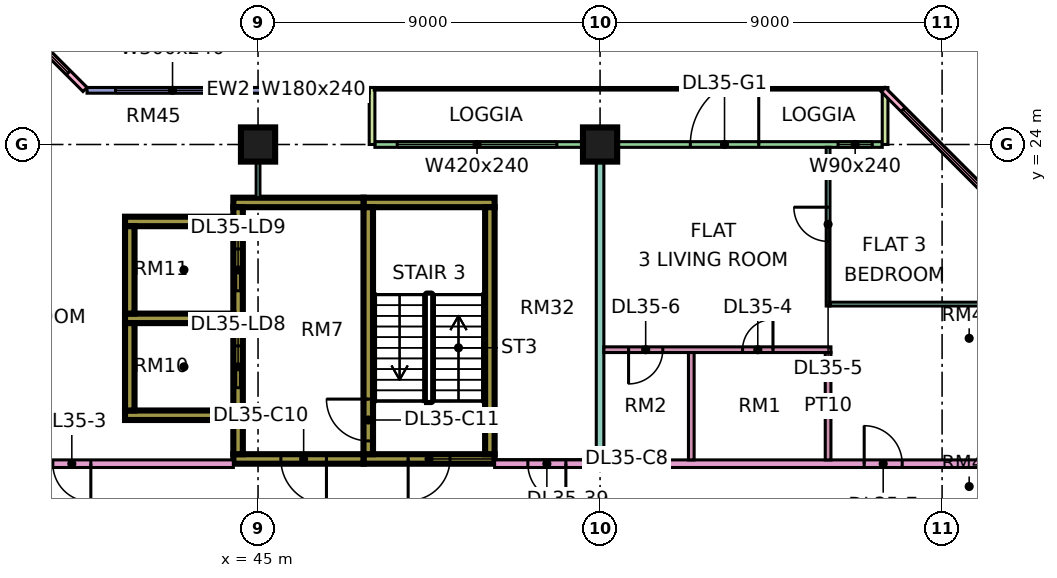
"""IFC4 building model, lengths in metres.
Left out: names, types, materials, properties, quantities, classifications, styles, units other than length and angle.
Written with IfcOpenShell. Run it as: python <this file> out.ifc"""

import sys

from ifc_helpers import new_model, si_unit, direction, frame, frame_2d, origin, origin_2d, place, context, subcontext, project, spatial, rectangle, extrude, element, fill, save


model = new_model("IFC4")
c1 = context("Model", 3, precision=1e-05, world=origin(), true_north=direction((0.0, 1.0)))
c2 = subcontext(c1, "Body", "Model", "MODEL_VIEW")
j1 = project(units=[si_unit("LENGTHUNIT", "METRE"), si_unit("PLANEANGLEUNIT", "RADIAN")], contexts=[c1])
p1 = place(None, origin())
s1 = spatial("IfcSite", under=j1, at=p1, CompositionType="ELEMENT")
p2 = place(p1, origin())
s2 = spatial("IfcBuilding", under=s1, at=p2, CompositionType="ELEMENT")
p3 = place(p2, frame((0.0, 0.0, 157.4)))
s3 = spatial("IfcBuildingStorey", under=s2, at=p3, CompositionType="ELEMENT", Elevation=157.4)
for number, where, z_axis, x_axis in (
    (1, (45.0, 24.0, 0.0), (0.0, 0.0, 1.0), (1.0, 0.0, 0.0)),
    (2, (54.0, 24.0, 0.0), (0.0, 0.0, 1.0), (1.0, 0.0, 0.0)),
):
    element("IfcColumn", number, at=place(p3, frame(where, z_axis=z_axis, x_axis=x_axis)), inside=s3, PredefinedType="COLUMN", context=c2, shape_type="SweptSolid", body=[
        extrude(rectangle(XDim=0.9, YDim=0.9, at=origin_2d()), origin(), (0.0, 0.0, 1.0), 3.75),
    ])
p4 = place(p3, frame((47.775, 15.725, 0.0), z_axis=(0.0, 0.0, 1.0), x_axis=(1.0, 0.0, 0.0)))
e3 = element("IfcWall", 3, at=p4, inside=s3, PredefinedType="SHEAR", context=c2, shape_type="SweptSolid", body=[
    extrude(rectangle(XDim=3.45, YDim=0.25, at=frame_2d((1.725, 0.0))), origin(), (0.0, 0.0, 1.0), 3.75),
])
p5 = place(p4, frame((1.175, 0.0, 0.0)))
e4 = element("IfcOpeningElement", 4, at=p5, cuts=e3, PredefinedType="OPENING", context=c2, shape_type="SweptSolid", body=[
    extrude(rectangle(XDim=1.1, YDim=2.2, at=frame_2d((0.55, 1.1))), frame((0.0, 0.135, 0.0), z_axis=(0.0, -1.0, 0.0), x_axis=(1.0, 0.0, 0.0)), (0.0, 0.0, 1.0), 0.27),
])
p6 = place(p3, frame((47.775, 22.475, 0.0), z_axis=(0.0, 0.0, 1.0), x_axis=(1.0, 0.0, 0.0)))
e5 = element("IfcWall", 5, at=p6, inside=s3, PredefinedType="SHEAR", context=c2, shape_type="SweptSolid", body=[
    extrude(rectangle(XDim=3.45, YDim=0.25, at=frame_2d((1.725, 0.0))), origin(), (0.0, 0.0, 1.0), 3.75),
])
p7 = place(p3, frame((47.9, 15.85, 0.0), z_axis=(0.0, 0.0, 1.0), x_axis=(0.0, 1.0, 0.0)))
e6 = element("IfcWall", 6, at=p7, inside=s3, PredefinedType="SHEAR", context=c2, shape_type="SweptSolid", body=[
    extrude(rectangle(XDim=6.5, YDim=0.25, at=frame_2d((3.25, 0.0))), origin(), (0.0, 0.0, 1.0), 3.75),
])
p8 = place(p7, frame((0.35, 0.0, 0.0)))
e7 = element("IfcOpeningElement", 7, at=p8, cuts=e6, PredefinedType="OPENING", context=c2, shape_type="SweptSolid", body=[
    extrude(rectangle(XDim=1.1, YDim=2.2, at=frame_2d((0.55, 1.1))), frame((0.0, 0.135, 0.0), z_axis=(0.0, -1.0, 0.0), x_axis=(1.0, 0.0, 0.0)), (0.0, 0.0, 1.0), 0.27),
])
p9 = place(p3, frame((51.1, 15.85, 0.0), z_axis=(0.0, 0.0, 1.0), x_axis=(0.0, 1.0, 0.0)))
e8 = element("IfcWall", 8, at=p9, inside=s3, PredefinedType="SHEAR", context=c2, shape_type="SweptSolid", body=[
    extrude(rectangle(XDim=6.5, YDim=0.25, at=frame_2d((3.25, 0.0))), origin(), (0.0, 0.0, 1.0), 3.75),
])
p10 = place(p3, frame((44.35, 15.725, 0.0), z_axis=(0.0, 0.0, 1.0), x_axis=(1.0, 0.0, 0.0)))
e9 = element("IfcWall", 9, at=p10, inside=s3, PredefinedType="SHEAR", context=c2, shape_type="SweptSolid", body=[
    extrude(rectangle(XDim=3.425, YDim=0.25, at=frame_2d((1.712, 0.0))), origin(), (0.0, 0.0, 1.0), 3.75),
])
p11 = place(p10, frame((1.25, 0.0, 0.0)))
e10 = element("IfcOpeningElement", 10, at=p11, cuts=e9, PredefinedType="OPENING", context=c2, shape_type="SweptSolid", body=[
    extrude(rectangle(XDim=1.2, YDim=2.2, at=frame_2d((0.6, 1.1))), frame((0.0, 0.135, 0.0), z_axis=(0.0, -1.0, 0.0), x_axis=(1.0, 0.0, 0.0)), (0.0, 0.0, 1.0), 0.27),
])
p12 = place(p3, frame((44.35, 22.475, 0.0), z_axis=(0.0, 0.0, 1.0), x_axis=(1.0, 0.0, 0.0)))
e11 = element("IfcWall", 11, at=p12, inside=s3, PredefinedType="SHEAR", context=c2, shape_type="SweptSolid", body=[
    extrude(rectangle(XDim=3.425, YDim=0.25, at=frame_2d((1.712, 0.0))), origin(), (0.0, 0.0, 1.0), 3.75),
])
p13 = place(p3, frame((44.475, 15.85, 0.0), z_axis=(0.0, 0.0, 1.0), x_axis=(0.0, 1.0, 0.0)))
e12 = element("IfcWall", 12, at=p13, inside=s3, PredefinedType="SHEAR", context=c2, shape_type="SweptSolid", body=[
    extrude(rectangle(XDim=6.5, YDim=0.25, at=frame_2d((3.25, 0.0))), origin(), (0.0, 0.0, 1.0), 3.75),
])
p14 = place(p13, frame((1.75, 0.0, 0.0)))
e13 = element("IfcOpeningElement", 13, at=p14, cuts=e12, PredefinedType="OPENING", context=c2, shape_type="SweptSolid", body=[
    extrude(rectangle(XDim=1.1, YDim=2.2, at=frame_2d((0.55, 1.1))), frame((0.0, 0.135, 0.0), z_axis=(0.0, -1.0, 0.0), x_axis=(1.0, 0.0, 0.0)), (0.0, 0.0, 1.0), 0.27),
])
p15 = place(p13, frame((4.3, 0.0, 0.0)))
e14 = element("IfcOpeningElement", 14, at=p15, cuts=e12, PredefinedType="OPENING", context=c2, shape_type="SweptSolid", body=[
    extrude(rectangle(XDim=1.1, YDim=2.2, at=frame_2d((0.55, 1.1))), frame((0.0, 0.135, 0.0), z_axis=(0.0, -1.0, 0.0), x_axis=(1.0, 0.0, 0.0)), (0.0, 0.0, 1.0), 0.27),
])
for number, where, z_axis, x_axis in (
    (15, (41.5, 16.875, 0.0), (0.0, 0.0, 1.0), (1.0, 0.0, 0.0)),
    (16, (41.5, 19.425, 0.0), (0.0, 0.0, 1.0), (1.0, 0.0, 0.0)),
    (17, (41.5, 21.975, 0.0), (0.0, 0.0, 1.0), (1.0, 0.0, 0.0)),
):
    element("IfcWall", number, at=place(p3, frame(where, z_axis=z_axis, x_axis=x_axis)), inside=s3, PredefinedType="SHEAR", context=c2, shape_type="SweptSolid", body=[
        extrude(rectangle(XDim=2.85, YDim=0.25, at=frame_2d((1.425, 0.0))), origin(), (0.0, 0.0, 1.0), 3.75),
    ])
for number, where, z_axis, x_axis in (
    (18, (41.625, 17.0, 0.0), (0.0, 0.0, 1.0), (0.0, 1.0, 0.0)),
    (19, (41.625, 19.55, 0.0), (0.0, 0.0, 1.0), (0.0, 1.0, 0.0)),
):
    element("IfcWall", number, at=place(p3, frame(where, z_axis=z_axis, x_axis=x_axis)), inside=s3, PredefinedType="SHEAR", context=c2, shape_type="SweptSolid", body=[
        extrude(rectangle(XDim=2.3, YDim=0.25, at=frame_2d((1.15, 0.0))), origin(), (0.0, 0.0, 1.0), 3.75),
    ])
p16 = place(p3, frame((61.425, 24.0, 0.0), z_axis=(0.0, 0.0, 1.0), x_axis=(-1.0, 0.0, 0.0)))
e20 = element("IfcWall", 20, at=p16, inside=s3, PredefinedType="SOLIDWALL", context=c2, shape_type="SweptSolid", body=[
    extrude(rectangle(XDim=13.35, YDim=0.15, at=frame_2d((6.675, 0.0))), origin(), (0.0, 0.0, 1.0), 3.35),
])
p17 = place(p16, frame((0.262, 0.0, 0.45)))
e21 = element("IfcOpeningElement", 21, at=p17, cuts=e20, PredefinedType="OPENING", context=c2, shape_type="SweptSolid", body=[
    extrude(rectangle(XDim=0.9, YDim=2.4, at=frame_2d((0.45, 1.2))), frame((0.0, 0.085, 0.0), z_axis=(0.0, -1.0, 0.0), x_axis=(1.0, 0.0, 0.0)), (0.0, 0.0, 1.0), 0.17),
])
p18 = place(p16, frame((3.25, 0.0, 0.0)))
e22 = element("IfcOpeningElement", 22, at=p18, cuts=e20, PredefinedType="OPENING", context=c2, shape_type="SweptSolid", body=[
    extrude(rectangle(XDim=1.8, YDim=2.4, at=frame_2d((0.9, 1.2))), frame((0.0, 0.085, 0.0), z_axis=(0.0, -1.0, 0.0), x_axis=(1.0, 0.0, 0.0)), (0.0, 0.0, 1.0), 0.17),
])
p19 = place(p16, frame((8.562, 0.0, 0.45)))
e23 = element("IfcOpeningElement", 23, at=p19, cuts=e20, PredefinedType="OPENING", context=c2, shape_type="SweptSolid", body=[
    extrude(rectangle(XDim=4.2, YDim=2.4, at=frame_2d((2.1, 1.2))), frame((0.0, 0.085, 0.0), z_axis=(0.0, -1.0, 0.0), x_axis=(1.0, 0.0, 0.0)), (0.0, 0.0, 1.0), 0.17),
])
for number, where, z_axis, x_axis in (
    (24, (61.5, 25.5, 0.0), (0.0, 0.0, 1.0), (0.0, -1.0, 0.0)),
    (25, (48.0, 25.5, 0.0), (0.0, 0.0, 1.0), (0.0, -1.0, 0.0)),
):
    element("IfcWall", number, at=place(p3, frame(where, z_axis=z_axis, x_axis=x_axis)), inside=s3, PredefinedType="SOLIDWALL", context=c2, shape_type="SweptSolid", body=[
        extrude(rectangle(XDim=1.5, YDim=0.15, at=frame_2d((0.75, 0.0))), origin(), (0.0, 0.0, 1.0), 3.35),
    ])
p20 = place(p3, frame((47.925, 25.425, 0.0), z_axis=(0.0, 0.0, 1.0), x_axis=(-1.0, 0.0, 0.0)))
e26 = element("IfcWall", 26, at=p20, inside=s3, PredefinedType="SOLIDWALL", context=c2, shape_type="SweptSolid", body=[
    extrude(rectangle(XDim=7.425, YDim=0.15, at=frame_2d((3.712, 0.0))), origin(), (0.0, 0.0, 1.0), 3.35),
])
p21 = place(p20, frame((0.562, 0.0, 0.45)))
e27 = element("IfcOpeningElement", 27, at=p21, cuts=e26, PredefinedType="OPENING", context=c2, shape_type="SweptSolid", body=[
    extrude(rectangle(XDim=1.8, YDim=2.4, at=frame_2d((0.9, 1.2))), frame((0.0, 0.085, 0.0), z_axis=(0.0, -1.0, 0.0), x_axis=(1.0, 0.0, 0.0)), (0.0, 0.0, 1.0), 0.17),
])
p22 = place(p20, frame((3.675, 0.0, 0.45)))
e28 = element("IfcOpeningElement", 28, at=p22, cuts=e26, PredefinedType="OPENING", context=c2, shape_type="SweptSolid", body=[
    extrude(rectangle(XDim=3.0, YDim=2.4, at=frame_2d((1.5, 1.2))), frame((0.0, 0.085, 0.0), z_axis=(0.0, -1.0, 0.0), x_axis=(1.0, 0.0, 0.0)), (0.0, 0.0, 1.0), 0.17),
])
p23 = place(p3, frame((40.447, 25.447, 0.0), z_axis=(0.0, 0.0, 1.0), x_axis=(-0.707106781187, 0.707106781187, 0.0)))
e29 = element("IfcWall", 29, at=p23, inside=s3, PredefinedType="SOLIDWALL", context=c2, shape_type="SweptSolid", body=[
    extrude(rectangle(XDim=4.243, YDim=0.15, at=frame_2d((2.121, 0.0))), origin(), (0.0, 0.0, 1.0), 3.35),
])
p24 = place(p23, frame((0.621, 0.0, 0.45)))
e30 = element("IfcOpeningElement", 30, at=p24, cuts=e29, PredefinedType="OPENING", context=c2, shape_type="SweptSolid", body=[
    extrude(rectangle(XDim=3.0, YDim=2.4, at=frame_2d((1.5, 1.2))), frame((0.0, 0.085, 0.0), z_axis=(0.0, -1.0, 0.0), x_axis=(1.0, 0.0, 0.0)), (0.0, 0.0, 1.0), 0.17),
])
p25 = place(p3, frame((64.447, 22.447, 0.0), z_axis=(0.0, 0.0, 1.0), x_axis=(-0.707106781187, 0.707106781187, 0.0)))
e31 = element("IfcWall", 31, at=p25, inside=s3, PredefinedType="SOLIDWALL", context=c2, shape_type="SweptSolid", body=[
    extrude(rectangle(XDim=4.243, YDim=0.15, at=frame_2d((2.121, 0.0))), origin(), (0.0, 0.0, 1.0), 3.35),
])
p26 = place(p25, frame((0.498, 0.0, 0.45)))
e32 = element("IfcOpeningElement", 32, at=p26, cuts=e31, PredefinedType="OPENING", context=c2, shape_type="SweptSolid", body=[
    extrude(rectangle(XDim=3.0, YDim=2.4, at=frame_2d((1.5, 1.2))), frame((0.0, 0.085, 0.0), z_axis=(0.0, -1.0, 0.0), x_axis=(1.0, 0.0, 0.0)), (0.0, 0.0, 1.0), 0.17),
])
p27 = place(p3, frame((34.0, 15.6, 0.0), z_axis=(0.0, 0.0, 1.0), x_axis=(1.0, 0.0, 0.0)))
e33 = element("IfcWall", 33, at=p27, inside=s3, PredefinedType="PARTITIONING", context=c2, shape_type="SweptSolid", body=[
    extrude(rectangle(XDim=10.35, YDim=0.2, at=frame_2d((5.175, 0.0))), origin(), (0.0, 0.0, 1.0), 3.35),
])
p28 = place(p27, frame((5.6, 0.0, 0.0)))
e34 = element("IfcOpeningElement", 34, at=p28, cuts=e33, PredefinedType="OPENING", context=c2, shape_type="SweptSolid", body=[
    extrude(rectangle(XDim=1.0, YDim=2.1, at=frame_2d((0.5, 1.05))), frame((0.0, 0.11, 0.0), z_axis=(0.0, -1.0, 0.0), x_axis=(1.0, 0.0, 0.0)), (0.0, 0.0, 1.0), 0.22),
])
p29 = place(p27, frame((0.45, 0.0, 0.0)))
e35 = element("IfcOpeningElement", 35, at=p29, cuts=e33, PredefinedType="OPENING", context=c2, shape_type="SweptSolid", body=[
    extrude(rectangle(XDim=1.2, YDim=2.1, at=frame_2d((0.6, 1.05))), frame((0.0, 0.11, 0.0), z_axis=(0.0, -1.0, 0.0), x_axis=(1.0, 0.0, 0.0)), (0.0, 0.0, 1.0), 0.22),
])
p30 = place(p3, frame((45.0, 22.6, 0.0), z_axis=(0.0, 0.0, 1.0), x_axis=(0.0, 1.0, 0.0)))
e36 = element("IfcWall", 36, at=p30, inside=s3, PredefinedType="PARTITIONING", context=c2, shape_type="SweptSolid", body=[
    extrude(rectangle(XDim=1.4, YDim=0.1, at=frame_2d((0.7, 0.0))), origin(), (0.0, 0.0, 1.0), 3.35),
])
p31 = place(p3, frame((51.225, 15.6, 0.0), z_axis=(0.0, 0.0, 1.0), x_axis=(1.0, 0.0, 0.0)))
e37 = element("IfcWall", 37, at=p31, inside=s3, PredefinedType="PARTITIONING", context=c2, shape_type="SweptSolid", body=[
    extrude(rectangle(XDim=13.125, YDim=0.2, at=frame_2d((6.562, 0.0))), origin(), (0.0, 0.0, 1.0), 3.35),
])
p32 = place(p31, frame((9.725, 0.0, 0.0)))
e38 = element("IfcOpeningElement", 38, at=p32, cuts=e37, PredefinedType="OPENING", context=c2, shape_type="SweptSolid", body=[
    extrude(rectangle(XDim=1.0, YDim=2.1, at=frame_2d((0.5, 1.05))), frame((0.0, 0.11, 0.0), z_axis=(0.0, -1.0, 0.0), x_axis=(1.0, 0.0, 0.0)), (0.0, 0.0, 1.0), 0.22),
])
p33 = place(p31, frame((0.875, 0.0, 0.0)))
e39 = element("IfcOpeningElement", 39, at=p33, cuts=e37, PredefinedType="OPENING", context=c2, shape_type="SweptSolid", body=[
    extrude(rectangle(XDim=1.0, YDim=2.1, at=frame_2d((0.5, 1.05))), frame((0.0, 0.11, 0.0), z_axis=(0.0, -1.0, 0.0), x_axis=(1.0, 0.0, 0.0)), (0.0, 0.0, 1.0), 0.22),
])
p34 = place(p3, frame((54.0, 15.7, 0.0), z_axis=(0.0, 0.0, 1.0), x_axis=(0.0, 1.0, 0.0)))
e40 = element("IfcWall", 40, at=p34, inside=s3, PredefinedType="PARTITIONING", context=c2, shape_type="SweptSolid", body=[
    extrude(rectangle(XDim=8.226, YDim=0.2, at=frame_2d((4.113, 0.0))), origin(), (0.0, 0.0, 1.0), 3.35),
])
p35 = place(p3, frame((54.1, 18.6, 0.0), z_axis=(0.0, 0.0, 1.0), x_axis=(1.0, 0.0, 0.0)))
e41 = element("IfcWall", 41, at=p35, inside=s3, PredefinedType="PARTITIONING", context=c2, shape_type="SweptSolid", body=[
    extrude(rectangle(XDim=5.975, YDim=0.15, at=frame_2d((2.987, 0.0))), origin(), (0.0, 0.0, 1.0), 3.35),
])
p36 = place(p35, frame((3.65, 0.0, 0.0)))
e42 = element("IfcOpeningElement", 42, at=p36, cuts=e41, PredefinedType="OPENING", context=c2, shape_type="SweptSolid", body=[
    extrude(rectangle(XDim=0.8, YDim=2.1, at=frame_2d((0.4, 1.05))), frame((0.0, 0.085, 0.0), z_axis=(0.0, -1.0, 0.0), x_axis=(1.0, 0.0, 0.0)), (0.0, 0.0, 1.0), 0.17),
])
p37 = place(p35, frame((0.65, 0.0, 0.0)))
e43 = element("IfcOpeningElement", 43, at=p37, cuts=e41, PredefinedType="OPENING", context=c2, shape_type="SweptSolid", body=[
    extrude(rectangle(XDim=0.9, YDim=2.1, at=frame_2d((0.45, 1.05))), frame((0.0, 0.085, 0.0), z_axis=(0.0, -1.0, 0.0), x_axis=(1.0, 0.0, 0.0)), (0.0, 0.0, 1.0), 0.17),
])
for number, where, z_axis, x_axis in (
    (44, (56.4, 15.7, 0.0), (0.0, 0.0, 1.0), (0.0, 1.0, 0.0)),
    (45, (60.0, 15.7, 0.0), (0.0, 0.0, 1.0), (0.0, 1.0, 0.0)),
):
    element("IfcWall", number, at=place(p3, frame(where, z_axis=z_axis, x_axis=x_axis)), inside=s3, PredefinedType="PARTITIONING", context=c2, shape_type="SweptSolid", body=[
        extrude(rectangle(XDim=2.825, YDim=0.15, at=frame_2d((1.413, 0.0))), origin(), (0.0, 0.0, 1.0), 3.35),
    ])
p38 = place(p3, frame((60.0, 19.75, 0.0), z_axis=(0.0, 0.0, 1.0), x_axis=(0.0, 1.0, 0.0)))
e46 = element("IfcWall", 46, at=p38, inside=s3, PredefinedType="PARTITIONING", context=c2, shape_type="SweptSolid", body=[
    extrude(rectangle(XDim=4.176, YDim=0.1, at=frame_2d((2.088, 0.0))), origin(), (0.0, 0.0, 1.0), 3.35),
])
p39 = place(p38, frame((1.7, 0.0, 0.0)))
e47 = element("IfcOpeningElement", 47, at=p39, cuts=e46, PredefinedType="OPENING", context=c2, shape_type="SweptSolid", body=[
    extrude(rectangle(XDim=0.9, YDim=2.1, at=frame_2d((0.45, 1.05))), frame((0.0, 0.06, 0.0), z_axis=(0.0, -1.0, 0.0), x_axis=(1.0, 0.0, 0.0)), (0.0, 0.0, 1.0), 0.12),
])
p40 = place(p3, frame((60.05, 19.8, 0.0), z_axis=(0.0, 0.0, 1.0), x_axis=(1.0, 0.0, 0.0)))
e48 = element("IfcWall", 48, at=p40, inside=s3, PredefinedType="PARTITIONING", context=c2, shape_type="SweptSolid", body=[
    extrude(rectangle(XDim=4.3, YDim=0.1, at=frame_2d((2.15, 0.0))), origin(), (0.0, 0.0, 1.0), 3.35),
])
p41 = place(p17, origin())
e49 = element("IfcWindow", 49, at=p41, inside=s3, PartitioningType="SINGLE_PANEL", PredefinedType="WINDOW", context=c2, shape_type="SweptSolid", body=[
    extrude(rectangle(XDim=0.9, YDim=2.4, at=frame_2d((0.45, 1.2))), frame((0.0, 0.03, 0.0), z_axis=(0.0, -1.0, 0.0), x_axis=(1.0, 0.0, 0.0)), (0.0, 0.0, 1.0), 0.06),
])
fill(e21, e49)
p42 = place(p18, frame((1.8, 0.0, 0.0), z_axis=(0.0, 0.0, 1.0), x_axis=(-1.0, 0.0, 0.0)))
e50 = element("IfcDoor", 50, at=p42, inside=s3, OperationType="DOUBLE_DOOR_SINGLE_SWING", PredefinedType="DOOR", context=c2, shape_type="SweptSolid", body=[
    extrude(rectangle(XDim=1.8, YDim=2.4, at=frame_2d((0.9, 1.2))), frame((0.0, 0.025, 0.0), z_axis=(0.0, -1.0, 0.0), x_axis=(1.0, 0.0, 0.0)), (0.0, 0.0, 1.0), 0.05),
])
fill(e22, e50)
p43 = place(p19, origin())
e51 = element("IfcWindow", 51, at=p43, inside=s3, PartitioningType="SINGLE_PANEL", PredefinedType="WINDOW", context=c2, shape_type="SweptSolid", body=[
    extrude(rectangle(XDim=4.2, YDim=2.4, at=frame_2d((2.1, 1.2))), frame((0.0, 0.03, 0.0), z_axis=(0.0, -1.0, 0.0), x_axis=(1.0, 0.0, 0.0)), (0.0, 0.0, 1.0), 0.06),
])
fill(e23, e51)
p44 = place(p21, origin())
e52 = element("IfcWindow", 52, at=p44, inside=s3, PartitioningType="SINGLE_PANEL", PredefinedType="WINDOW", context=c2, shape_type="SweptSolid", body=[
    extrude(rectangle(XDim=1.8, YDim=2.4, at=frame_2d((0.9, 1.2))), frame((0.0, 0.03, 0.0), z_axis=(0.0, -1.0, 0.0), x_axis=(1.0, 0.0, 0.0)), (0.0, 0.0, 1.0), 0.06),
])
fill(e27, e52)
p45 = place(p22, origin())
e53 = element("IfcWindow", 53, at=p45, inside=s3, PartitioningType="SINGLE_PANEL", PredefinedType="WINDOW", context=c2, shape_type="SweptSolid", body=[
    extrude(rectangle(XDim=3.0, YDim=2.4, at=frame_2d((1.5, 1.2))), frame((0.0, 0.03, 0.0), z_axis=(0.0, -1.0, 0.0), x_axis=(1.0, 0.0, 0.0)), (0.0, 0.0, 1.0), 0.06),
])
fill(e28, e53)
p46 = place(p24, origin())
e54 = element("IfcWindow", 54, at=p46, inside=s3, PartitioningType="SINGLE_PANEL", PredefinedType="WINDOW", context=c2, shape_type="SweptSolid", body=[
    extrude(rectangle(XDim=3.0, YDim=2.4, at=frame_2d((1.5, 1.2))), frame((0.0, 0.03, 0.0), z_axis=(0.0, -1.0, 0.0), x_axis=(1.0, 0.0, 0.0)), (0.0, 0.0, 1.0), 0.06),
])
fill(e30, e54)
p47 = place(p26, origin())
e55 = element("IfcWindow", 55, at=p47, inside=s3, PartitioningType="SINGLE_PANEL", PredefinedType="WINDOW", context=c2, shape_type="SweptSolid", body=[
    extrude(rectangle(XDim=3.0, YDim=2.4, at=frame_2d((1.5, 1.2))), frame((0.0, 0.03, 0.0), z_axis=(0.0, -1.0, 0.0), x_axis=(1.0, 0.0, 0.0)), (0.0, 0.0, 1.0), 0.06),
])
fill(e32, e55)
p48 = place(p5, frame((1.1, 0.0, 0.0), z_axis=(0.0, 0.0, 1.0), x_axis=(-1.0, 0.0, 0.0)))
e56 = element("IfcDoor", 56, at=p48, inside=s3, OperationType="SINGLE_SWING_LEFT", PredefinedType="DOOR", context=c2, shape_type="SweptSolid", body=[
    extrude(rectangle(XDim=1.1, YDim=2.2, at=frame_2d((0.55, 1.1))), frame((0.0, 0.025, 0.0), z_axis=(0.0, -1.0, 0.0), x_axis=(1.0, 0.0, 0.0)), (0.0, 0.0, 1.0), 0.05),
])
fill(e4, e56)
p49 = place(p11, origin())
e57 = element("IfcDoor", 57, at=p49, inside=s3, OperationType="SINGLE_SWING_RIGHT", PredefinedType="DOOR", context=c2, shape_type="SweptSolid", body=[
    extrude(rectangle(XDim=1.2, YDim=2.2, at=frame_2d((0.6, 1.1))), frame((0.0, 0.025, 0.0), z_axis=(0.0, -1.0, 0.0), x_axis=(1.0, 0.0, 0.0)), (0.0, 0.0, 1.0), 0.05),
])
fill(e10, e57)
p50 = place(p8, frame((1.1, 0.0, 0.0), z_axis=(0.0, 0.0, 1.0), x_axis=(-1.0, 0.0, 0.0)))
e58 = element("IfcDoor", 58, at=p50, inside=s3, OperationType="SINGLE_SWING_RIGHT", PredefinedType="DOOR", context=c2, shape_type="SweptSolid", body=[
    extrude(rectangle(XDim=1.1, YDim=2.2, at=frame_2d((0.55, 1.1))), frame((0.0, 0.025, 0.0), z_axis=(0.0, -1.0, 0.0), x_axis=(1.0, 0.0, 0.0)), (0.0, 0.0, 1.0), 0.05),
])
fill(e7, e58)
p51 = place(p14, origin())
e59 = element("IfcDoor", 59, at=p51, inside=s3, OperationType="DOUBLE_DOOR_SLIDING", PredefinedType="DOOR", context=c2, shape_type="SweptSolid", body=[
    extrude(rectangle(XDim=1.1, YDim=2.2, at=frame_2d((0.55, 1.1))), frame((0.0, 0.025, 0.0), z_axis=(0.0, -1.0, 0.0), x_axis=(1.0, 0.0, 0.0)), (0.0, 0.0, 1.0), 0.05),
])
fill(e13, e59)
p52 = place(p15, origin())
e60 = element("IfcDoor", 60, at=p52, inside=s3, OperationType="DOUBLE_DOOR_SLIDING", PredefinedType="DOOR", context=c2, shape_type="SweptSolid", body=[
    extrude(rectangle(XDim=1.1, YDim=2.2, at=frame_2d((0.55, 1.1))), frame((0.0, 0.025, 0.0), z_axis=(0.0, -1.0, 0.0), x_axis=(1.0, 0.0, 0.0)), (0.0, 0.0, 1.0), 0.05),
])
fill(e14, e60)
p53 = place(p28, origin())
e61 = element("IfcDoor", 61, at=p53, inside=s3, OperationType="SINGLE_SWING_RIGHT", PredefinedType="DOOR", context=c2, shape_type="SweptSolid", body=[
    extrude(rectangle(XDim=1.0, YDim=2.1, at=frame_2d((0.5, 1.05))), frame((0.0, 0.025, 0.0), z_axis=(0.0, -1.0, 0.0), x_axis=(1.0, 0.0, 0.0)), (0.0, 0.0, 1.0), 0.05),
])
fill(e34, e61)
p54 = place(p36, frame((0.8, 0.0, 0.0), z_axis=(0.0, 0.0, 1.0), x_axis=(-1.0, 0.0, 0.0)))
e62 = element("IfcDoor", 62, at=p54, inside=s3, OperationType="SINGLE_SWING_RIGHT", PredefinedType="DOOR", context=c2, shape_type="SweptSolid", body=[
    extrude(rectangle(XDim=0.8, YDim=2.1, at=frame_2d((0.4, 1.05))), frame((0.0, 0.025, 0.0), z_axis=(0.0, -1.0, 0.0), x_axis=(1.0, 0.0, 0.0)), (0.0, 0.0, 1.0), 0.05),
])
fill(e42, e62)
p55 = place(p39, frame((0.9, 0.0, 0.0), z_axis=(0.0, 0.0, 1.0), x_axis=(-1.0, 0.0, 0.0)))
e63 = element("IfcDoor", 63, at=p55, inside=s3, OperationType="SINGLE_SWING_RIGHT", PredefinedType="DOOR", context=c2, shape_type="SweptSolid", body=[
    extrude(rectangle(XDim=0.9, YDim=2.1, at=frame_2d((0.45, 1.05))), frame((0.0, 0.025, 0.0), z_axis=(0.0, -1.0, 0.0), x_axis=(1.0, 0.0, 0.0)), (0.0, 0.0, 1.0), 0.05),
])
fill(e47, e63)
p56 = place(p37, frame((0.9, 0.0, 0.0), z_axis=(0.0, 0.0, 1.0), x_axis=(-1.0, 0.0, 0.0)))
e64 = element("IfcDoor", 64, at=p56, inside=s3, OperationType="SINGLE_SWING_LEFT", PredefinedType="DOOR", context=c2, shape_type="SweptSolid", body=[
    extrude(rectangle(XDim=0.9, YDim=2.1, at=frame_2d((0.45, 1.05))), frame((0.0, 0.025, 0.0), z_axis=(0.0, -1.0, 0.0), x_axis=(1.0, 0.0, 0.0)), (0.0, 0.0, 1.0), 0.05),
])
fill(e43, e64)
p57 = place(p32, origin())
e65 = element("IfcDoor", 65, at=p57, inside=s3, OperationType="SINGLE_SWING_LEFT", PredefinedType="DOOR", context=c2, shape_type="SweptSolid", body=[
    extrude(rectangle(XDim=1.0, YDim=2.1, at=frame_2d((0.5, 1.05))), frame((0.0, 0.025, 0.0), z_axis=(0.0, -1.0, 0.0), x_axis=(1.0, 0.0, 0.0)), (0.0, 0.0, 1.0), 0.05),
])
fill(e38, e65)
p58 = place(p33, origin())
e66 = element("IfcDoor", 66, at=p58, inside=s3, OperationType="SINGLE_SWING_RIGHT", PredefinedType="DOOR", context=c2, shape_type="SweptSolid", body=[
    extrude(rectangle(XDim=1.0, YDim=2.1, at=frame_2d((0.5, 1.05))), frame((0.0, 0.025, 0.0), z_axis=(0.0, -1.0, 0.0), x_axis=(1.0, 0.0, 0.0)), (0.0, 0.0, 1.0), 0.05),
])
fill(e39, e66)
save(model, sys.argv[1])
